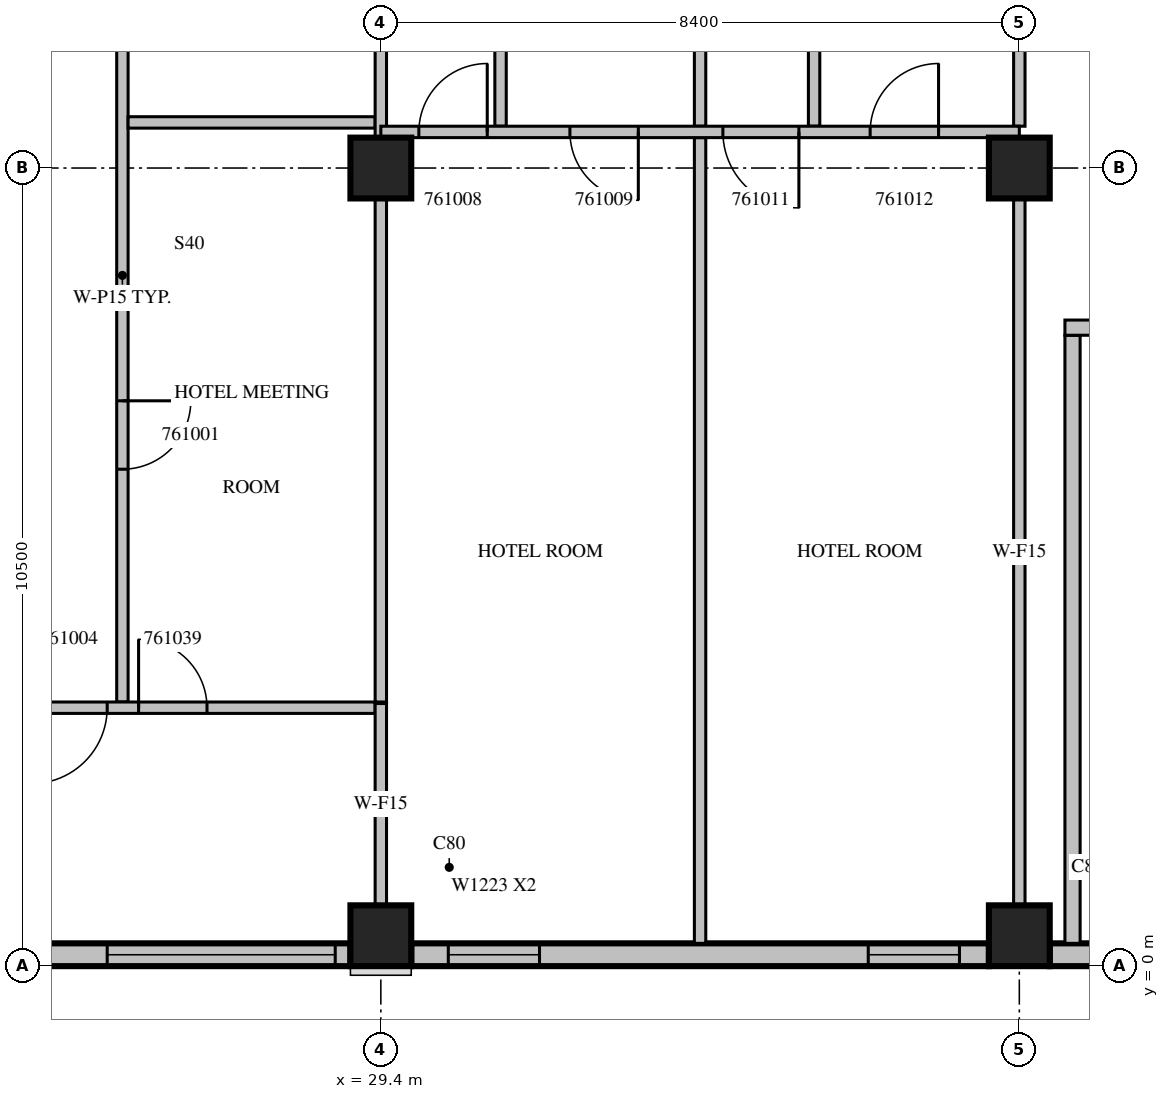
"""IFC4 building model, lengths in metres.
Left out: names, types, materials, properties, quantities, classifications, styles, units other than length and angle.
Written with IfcOpenShell. Run it as: python <this file> out.ifc"""

import sys

from ifc_helpers import new_model, si_unit, direction, frame, frame_2d, origin, origin_2d, place, context, subcontext, project, spatial, rectangle, extrude, source, transform, mapped, element, fill, save


model = new_model("IFC4")
c1 = context("Model", 3, precision=1e-05, world=origin(), true_north=direction((0.0, 1.0)))
c2 = subcontext(c1, "Body", "Model", "MODEL_VIEW")
j1 = project(units=[si_unit("LENGTHUNIT", "METRE"), si_unit("PLANEANGLEUNIT", "RADIAN")], contexts=[c1])
p1 = place(None, origin())
s1 = spatial("IfcSite", under=j1, at=p1, CompositionType="ELEMENT")
p2 = place(p1, origin())
s2 = spatial("IfcBuilding", under=s1, at=p2, CompositionType="ELEMENT")
p3 = place(p2, frame((0.0, 0.0, 265.2)))
s3 = spatial("IfcBuildingStorey", under=s2, at=p3, CompositionType="ELEMENT", Elevation=265.2)
m1 = source(origin(), c2, "Body", "SweptSolid", [
    extrude(rectangle(XDim=0.8, YDim=0.8, at=origin_2d()), origin(), (0.0, 0.0, 1.0), 3.8),
])
for number, where, z_axis, x_axis in (
    (1, (29.4, 0.4, 0.0), (0.0, 0.0, 1.0), (1.0, 0.0, 0.0)),
    (2, (37.8, 0.4, 0.0), (0.0, 0.0, 1.0), (1.0, 0.0, 0.0)),
    (3, (29.4, 10.5, 0.0), (0.0, 0.0, 1.0), (1.0, 0.0, 0.0)),
    (4, (37.8, 10.5, 0.0), (0.0, 0.0, 1.0), (1.0, 0.0, 0.0)),
):
    element("IfcColumn", number, at=place(p3, frame(where, z_axis=z_axis, x_axis=x_axis)), inside=s3, PredefinedType="COLUMN", context=c2, shape_type="MappedRepresentation", body=[
        mapped(m1, transform((0.0, 0.0, 0.0), scale=1.0)),
    ])
m2 = source(origin(), c2, "Body", "SweptSolid", [
    extrude(rectangle(XDim=7.6, YDim=0.3, at=frame_2d((3.8, 0.0))), origin(), (0.0, 0.0, 1.0), 3.4),
])
p4 = place(p3, frame((21.4, 0.15, 0.0), z_axis=(0.0, 0.0, 1.0), x_axis=(1.0, 0.0, 0.0)))
e5 = element("IfcWall", 5, at=p4, inside=s3, PredefinedType="STANDARD", context=c2, shape_type="MappedRepresentation", body=[
    mapped(m2, transform((0.0, 0.0, 0.0), scale=1.0)),
])
m3 = source(origin(), c2, "Body", "SweptSolid", [
    extrude(rectangle(XDim=3.0, YDim=2.3, at=frame_2d((1.5, 1.15))), frame((0.0, 0.16, 0.0), z_axis=(0.0, -1.0, 0.0), x_axis=(1.0, 0.0, 0.0)), (0.0, 0.0, 1.0), 0.32),
])
p5 = place(p4, frame((0.2, 0.0, 0.6)))
e6 = element("IfcOpeningElement", 6, at=p5, cuts=e5, PredefinedType="OPENING", context=c2, shape_type="MappedRepresentation", body=[
    mapped(m3, transform((0.0, 0.0, 0.0), scale=1.0)),
])
p6 = place(p4, frame((4.4, 0.0, 0.6)))
e7 = element("IfcOpeningElement", 7, at=p6, cuts=e5, PredefinedType="OPENING", context=c2, shape_type="MappedRepresentation", body=[
    mapped(m3, transform((0.0, 0.0, 0.0), scale=1.0)),
])
p7 = place(p3, frame((29.8, 0.15, 0.0), z_axis=(0.0, 0.0, 1.0), x_axis=(1.0, 0.0, 0.0)))
e8 = element("IfcWall", 8, at=p7, inside=s3, PredefinedType="STANDARD", context=c2, shape_type="MappedRepresentation", body=[
    mapped(m2, transform((0.0, 0.0, 0.0), scale=1.0)),
])
m4 = source(origin(), c2, "Body", "SweptSolid", [
    extrude(rectangle(XDim=1.2, YDim=2.3, at=frame_2d((0.6, 1.15))), frame((0.0, 0.16, 0.0), z_axis=(0.0, -1.0, 0.0), x_axis=(1.0, 0.0, 0.0)), (0.0, 0.0, 1.0), 0.32),
])
p8 = place(p7, frame((0.487, 0.0, 0.6)))
e9 = element("IfcOpeningElement", 9, at=p8, cuts=e8, PredefinedType="OPENING", context=c2, shape_type="MappedRepresentation", body=[
    mapped(m4, transform((0.0, 0.0, 0.0), scale=1.0)),
])
p9 = place(p7, frame((6.013, 0.0, 0.6)))
e10 = element("IfcOpeningElement", 10, at=p9, cuts=e8, PredefinedType="OPENING", context=c2, shape_type="MappedRepresentation", body=[
    mapped(m4, transform((0.0, 0.0, 0.0), scale=1.0)),
])
m5 = source(origin(), c2, "Body", "SweptSolid", [
    extrude(rectangle(XDim=2.0, YDim=0.3, at=frame_2d((1.0, 0.0))), origin(), (0.0, 0.0, 1.0), 3.4),
])
p10 = place(p3, frame((38.2, 0.15, 0.0), z_axis=(0.0, 0.0, 1.0), x_axis=(1.0, 0.0, 0.0)))
e11 = element("IfcWall", 11, at=p10, inside=s3, PredefinedType="STANDARD", context=c2, shape_type="MappedRepresentation", body=[
    mapped(m5, transform((0.0, 0.0, 0.0), scale=1.0)),
])
m6 = source(origin(), c2, "Body", "SweptSolid", [
    extrude(rectangle(XDim=8.0, YDim=0.2, at=frame_2d((4.0, 0.0))), origin(), (0.0, 0.0, 1.0), 3.4),
])
p11 = place(p3, frame((38.5, 0.3, 0.0), z_axis=(0.0, 0.0, 1.0), x_axis=(0.0, 1.0, 0.0)))
e12 = element("IfcWall", 12, at=p11, inside=s3, PredefinedType="PARTITIONING", context=c2, shape_type="MappedRepresentation", body=[
    mapped(m6, transform((0.0, 0.0, 0.0), scale=1.0)),
])
m7 = source(origin(), c2, "Body", "SweptSolid", [
    extrude(rectangle(XDim=5.45, YDim=0.2, at=frame_2d((2.725, 0.0))), origin(), (0.0, 0.0, 1.0), 3.4),
])
p12 = place(p3, frame((38.4, 8.4, 0.0), z_axis=(0.0, 0.0, 1.0), x_axis=(1.0, 0.0, 0.0)))
e13 = element("IfcWall", 13, at=p12, inside=s3, PredefinedType="PARTITIONING", context=c2, shape_type="MappedRepresentation", body=[
    mapped(m7, transform((0.0, 0.0, 0.0), scale=1.0)),
])
m8 = source(origin(), c2, "Body", "SweptSolid", [
    extrude(rectangle(XDim=1.2, YDim=2.1, at=frame_2d((0.6, 1.05))), frame((0.0, 0.11, 0.0), z_axis=(0.0, -1.0, 0.0), x_axis=(1.0, 0.0, 0.0)), (0.0, 0.0, 1.0), 0.22),
])
p13 = place(p12, frame((0.4, 0.0, 0.0)))
e14 = element("IfcOpeningElement", 14, at=p13, cuts=e13, PredefinedType="OPENING", context=c2, shape_type="MappedRepresentation", body=[
    mapped(m8, transform((0.0, 0.0, 0.0), scale=1.0)),
])
m9 = source(origin(), c2, "Body", "SweptSolid", [
    extrude(rectangle(XDim=0.9, YDim=2.1, at=frame_2d((0.45, 1.05))), frame((0.0, 0.11, 0.0), z_axis=(0.0, -1.0, 0.0), x_axis=(1.0, 0.0, 0.0)), (0.0, 0.0, 1.0), 0.22),
])
p14 = place(p12, frame((3.25, 0.0, 0.0)))
e15 = element("IfcOpeningElement", 15, at=p14, cuts=e13, PredefinedType="OPENING", context=c2, shape_type="MappedRepresentation", body=[
    mapped(m9, transform((0.0, 0.0, 0.0), scale=1.0)),
])
m10 = source(origin(), c2, "Body", "SweptSolid", [
    extrude(rectangle(XDim=11.225, YDim=0.15, at=frame_2d((5.612, 0.0))), origin(), (0.0, 0.0, 1.0), 3.4),
])
p15 = place(p3, frame((26.0, 14.7, 0.0), z_axis=(0.0, 0.0, 1.0), x_axis=(0.0, -1.0, 0.0)))
e16 = element("IfcWall", 16, at=p15, inside=s3, PredefinedType="PARTITIONING", context=c2, shape_type="MappedRepresentation", body=[
    mapped(m10, transform((0.0, 0.0, 0.0), scale=1.0)),
])
m11 = source(origin(), c2, "Body", "SweptSolid", [
    extrude(rectangle(XDim=0.9, YDim=2.1, at=frame_2d((0.45, 1.05))), frame((0.0, 0.085, 0.0), z_axis=(0.0, -1.0, 0.0), x_axis=(1.0, 0.0, 0.0)), (0.0, 0.0, 1.0), 0.17),
])
p16 = place(p15, frame((7.263, 0.0, 0.0)))
e17 = element("IfcOpeningElement", 17, at=p16, cuts=e16, PredefinedType="OPENING", context=c2, shape_type="MappedRepresentation", body=[
    mapped(m11, transform((0.0, 0.0, 0.0), scale=1.0)),
])
p17 = place(p15, frame((0.775, 0.0, 0.0)))
e18 = element("IfcOpeningElement", 18, at=p17, cuts=e16, PredefinedType="OPENING", context=c2, shape_type="MappedRepresentation", body=[
    mapped(m11, transform((0.0, 0.0, 0.0), scale=1.0)),
])
m12 = source(origin(), c2, "Body", "SweptSolid", [
    extrude(rectangle(XDim=3.25, YDim=0.15, at=frame_2d((1.625, 0.0))), origin(), (0.0, 0.0, 1.0), 3.4),
])
p18 = place(p3, frame((29.325, 11.1, 0.0), z_axis=(0.0, 0.0, 1.0), x_axis=(-1.0, 0.0, 0.0)))
e19 = element("IfcWall", 19, at=p18, inside=s3, PredefinedType="PARTITIONING", context=c2, shape_type="MappedRepresentation", body=[
    mapped(m12, transform((0.0, 0.0, 0.0), scale=1.0)),
])
m13 = source(origin(), c2, "Body", "SweptSolid", [
    extrude(rectangle(XDim=6.626, YDim=0.15, at=frame_2d((3.313, 0.0))), origin(), (0.0, 0.0, 1.0), 3.4),
])
p19 = place(p3, frame((29.4, 3.475, 0.0), z_axis=(0.0, 0.0, 1.0), x_axis=(0.0, 1.0, 0.0)))
e20 = element("IfcWall", 20, at=p19, inside=s3, PredefinedType="PARTITIONING", context=c2, shape_type="MappedRepresentation", body=[
    mapped(m13, transform((0.0, 0.0, 0.0), scale=1.0)),
])
m14 = source(origin(), c2, "Body", "SweptSolid", [
    extrude(rectangle(XDim=3.801, YDim=0.15, at=frame_2d((1.901, 0.0))), origin(), (0.0, 0.0, 1.0), 3.4),
])
p20 = place(p3, frame((29.4, 10.899, 0.0), z_axis=(0.0, 0.0, 1.0), x_axis=(0.0, 1.0, 0.0)))
e21 = element("IfcWall", 21, at=p20, inside=s3, PredefinedType="PARTITIONING", context=c2, shape_type="MappedRepresentation", body=[
    mapped(m14, transform((0.0, 0.0, 0.0), scale=1.0)),
])
m15 = source(origin(), c2, "Body", "SweptSolid", [
    extrude(rectangle(XDim=7.525, YDim=0.15, at=frame_2d((3.763, 0.0))), origin(), (0.0, 0.0, 1.0), 3.4),
])
p21 = place(p3, frame((21.8, 3.4, 0.0), z_axis=(0.0, 0.0, 1.0), x_axis=(1.0, 0.0, 0.0)))
e22 = element("IfcWall", 22, at=p21, inside=s3, PredefinedType="PARTITIONING", context=c2, shape_type="MappedRepresentation", body=[
    mapped(m15, transform((0.0, 0.0, 0.0), scale=1.0)),
])
m16 = source(origin(), c2, "Body", "SweptSolid", [
    extrude(rectangle(XDim=1.0, YDim=2.1, at=frame_2d((0.5, 1.05))), frame((0.0, 0.085, 0.0), z_axis=(0.0, -1.0, 0.0), x_axis=(1.0, 0.0, 0.0)), (0.0, 0.0, 1.0), 0.17),
])
p22 = place(p21, frame((3.0, 0.0, 0.0)))
e23 = element("IfcOpeningElement", 23, at=p22, cuts=e22, PredefinedType="OPENING", context=c2, shape_type="MappedRepresentation", body=[
    mapped(m16, transform((0.0, 0.0, 0.0), scale=1.0)),
])
p23 = place(p21, frame((4.413, 0.0, 0.0)))
e24 = element("IfcOpeningElement", 24, at=p23, cuts=e22, PredefinedType="OPENING", context=c2, shape_type="MappedRepresentation", body=[
    mapped(m11, transform((0.0, 0.0, 0.0), scale=1.0)),
])
m17 = source(origin(), c2, "Body", "SweptSolid", [
    extrude(rectangle(XDim=10.6, YDim=0.15, at=frame_2d((5.3, 0.0))), origin(), (0.0, 0.0, 1.0), 3.4),
])
p24 = place(p3, frame((33.6, 0.3, 0.0), z_axis=(0.0, 0.0, 1.0), x_axis=(0.0, 1.0, 0.0)))
e25 = element("IfcWall", 25, at=p24, inside=s3, PredefinedType="PARTITIONING", context=c2, shape_type="MappedRepresentation", body=[
    mapped(m17, transform((0.0, 0.0, 0.0), scale=1.0)),
])
m18 = source(origin(), c2, "Body", "SweptSolid", [
    extrude(rectangle(XDim=3.65, YDim=0.15, at=frame_2d((1.825, 0.0))), origin(), (0.0, 0.0, 1.0), 3.4),
])
for number, where, z_axis, x_axis in (
    (26, (30.975, 11.05, 0.0), (0.0, 0.0, 1.0), (0.0, 1.0, 0.0)),
    (27, (33.6, 11.05, 0.0), (0.0, 0.0, 1.0), (0.0, 1.0, 0.0)),
    (28, (35.1, 11.05, 0.0), (0.0, 0.0, 1.0), (0.0, 1.0, 0.0)),
):
    element("IfcWall", number, at=place(p3, frame(where, z_axis=z_axis, x_axis=x_axis)), inside=s3, PredefinedType="PARTITIONING", context=c2, shape_type="MappedRepresentation", body=[
        mapped(m18, transform((0.0, 0.0, 0.0), scale=1.0)),
    ])
m19 = source(origin(), c2, "Body", "SweptSolid", [
    extrude(rectangle(XDim=2.656, YDim=0.15, at=frame_2d((1.328, 0.0))), origin(), (0.0, 0.0, 1.0), 3.4),
])
p25 = place(p3, frame((29.4, 0.799, 0.0), z_axis=(0.0, 0.0, 1.0), x_axis=(0.0, 1.0, 0.0)))
e29 = element("IfcWall", 29, at=p25, inside=s3, PredefinedType="PARTITIONING", context=c2, shape_type="MappedRepresentation", body=[
    mapped(m19, transform((0.0, 0.0, 0.0), scale=1.0)),
])
m20 = source(origin(), c2, "Body", "SweptSolid", [
    extrude(rectangle(XDim=9.302, YDim=0.15, at=frame_2d((4.651, 0.0))), origin(), (0.0, 0.0, 1.0), 3.4),
])
p26 = place(p3, frame((37.8, 0.799, 0.0), z_axis=(0.0, 0.0, 1.0), x_axis=(0.0, 1.0, 0.0)))
e30 = element("IfcWall", 30, at=p26, inside=s3, PredefinedType="PARTITIONING", context=c2, shape_type="MappedRepresentation", body=[
    mapped(m20, transform((0.0, 0.0, 0.0), scale=1.0)),
])
p27 = place(p3, frame((37.8, 11.05, 0.0), z_axis=(0.0, 0.0, 1.0), x_axis=(0.0, 1.0, 0.0)))
e31 = element("IfcWall", 31, at=p27, inside=s3, PredefinedType="PARTITIONING", context=c2, shape_type="MappedRepresentation", body=[
    mapped(m18, transform((0.0, 0.0, 0.0), scale=1.0)),
])
m21 = source(origin(), c2, "Body", "SweptSolid", [
    extrude(rectangle(XDim=8.4, YDim=0.15, at=frame_2d((4.2, 0.0))), origin(), (0.0, 0.0, 1.0), 3.4),
])
p28 = place(p3, frame((37.8, 10.975, 0.0), z_axis=(0.0, 0.0, 1.0), x_axis=(-1.0, 0.0, 0.0)))
e32 = element("IfcWall", 32, at=p28, inside=s3, PredefinedType="PARTITIONING", context=c2, shape_type="MappedRepresentation", body=[
    mapped(m21, transform((0.0, 0.0, 0.0), scale=1.0)),
])
p29 = place(p28, frame((7.0, 0.0, 0.0)))
e33 = element("IfcOpeningElement", 33, at=p29, cuts=e32, PredefinedType="OPENING", context=c2, shape_type="MappedRepresentation", body=[
    mapped(m11, transform((0.0, 0.0, 0.0), scale=1.0)),
])
p30 = place(p28, frame((5.013, 0.0, 0.0)))
e34 = element("IfcOpeningElement", 34, at=p30, cuts=e32, PredefinedType="OPENING", context=c2, shape_type="MappedRepresentation", body=[
    mapped(m11, transform((0.0, 0.0, 0.0), scale=1.0)),
])
p31 = place(p28, frame((2.9, 0.0, 0.0)))
e35 = element("IfcOpeningElement", 35, at=p31, cuts=e32, PredefinedType="OPENING", context=c2, shape_type="MappedRepresentation", body=[
    mapped(m16, transform((0.0, 0.0, 0.0), scale=1.0)),
])
p32 = place(p28, frame((1.062, 0.0, 0.0)))
e36 = element("IfcOpeningElement", 36, at=p32, cuts=e32, PredefinedType="OPENING", context=c2, shape_type="MappedRepresentation", body=[
    mapped(m11, transform((0.0, 0.0, 0.0), scale=1.0)),
])
m22 = source(origin(), c2, "Body", "SweptSolid", [
    extrude(rectangle(XDim=3.0, YDim=2.3, at=frame_2d((1.5, 1.15))), frame((0.0, 0.03, 0.0), z_axis=(0.0, -1.0, 0.0), x_axis=(1.0, 0.0, 0.0)), (0.0, 0.0, 1.0), 0.06),
])
p33 = place(p6, origin())
e37 = element("IfcWindow", 37, at=p33, inside=s3, PartitioningType="SINGLE_PANEL", PredefinedType="WINDOW", context=c2, shape_type="MappedRepresentation", body=[
    mapped(m22, transform((0.0, 0.0, 0.0), scale=1.0)),
])
fill(e7, e37)
m23 = source(origin(), c2, "Body", "SweptSolid", [
    extrude(rectangle(XDim=1.2, YDim=2.3, at=frame_2d((0.6, 1.15))), frame((0.0, 0.03, 0.0), z_axis=(0.0, -1.0, 0.0), x_axis=(1.0, 0.0, 0.0)), (0.0, 0.0, 1.0), 0.06),
])
p34 = place(p8, origin())
e38 = element("IfcWindow", 38, at=p34, inside=s3, PartitioningType="SINGLE_PANEL", PredefinedType="WINDOW", context=c2, shape_type="MappedRepresentation", body=[
    mapped(m23, transform((0.0, 0.0, 0.0), scale=1.0)),
])
fill(e9, e38)
p35 = place(p9, origin())
e39 = element("IfcWindow", 39, at=p35, inside=s3, PartitioningType="SINGLE_PANEL", PredefinedType="WINDOW", context=c2, shape_type="MappedRepresentation", body=[
    mapped(m23, transform((0.0, 0.0, 0.0), scale=1.0)),
])
fill(e10, e39)
m24 = source(origin(), c2, "Body", "SweptSolid", [
    extrude(rectangle(XDim=0.9, YDim=2.1, at=frame_2d((0.45, 1.05))), frame((0.0, 0.025, 0.0), z_axis=(0.0, -1.0, 0.0), x_axis=(1.0, 0.0, 0.0)), (0.0, 0.0, 1.0), 0.05),
])
p36 = place(p16, origin())
e40 = element("IfcDoor", 40, at=p36, inside=s3, OperationType="SINGLE_SWING_LEFT", PredefinedType="DOOR", context=c2, shape_type="MappedRepresentation", body=[
    mapped(m24, transform((0.0, 0.0, 0.0), scale=1.0)),
])
fill(e17, e40)
m25 = source(origin(), c2, "Body", "SweptSolid", [
    extrude(rectangle(XDim=1.0, YDim=2.1, at=frame_2d((0.5, 1.05))), frame((0.0, 0.025, 0.0), z_axis=(0.0, -1.0, 0.0), x_axis=(1.0, 0.0, 0.0)), (0.0, 0.0, 1.0), 0.05),
])
p37 = place(p22, origin())
e41 = element("IfcDoor", 41, at=p37, inside=s3, OperationType="SINGLE_SWING_RIGHT", PredefinedType="DOOR", context=c2, shape_type="MappedRepresentation", body=[
    mapped(m25, transform((0.0, 0.0, 0.0), scale=1.0)),
])
fill(e23, e41)
p38 = place(p29, origin())
e42 = element("IfcDoor", 42, at=p38, inside=s3, OperationType="SINGLE_SWING_RIGHT", PredefinedType="DOOR", context=c2, shape_type="MappedRepresentation", body=[
    mapped(m24, transform((0.0, 0.0, 0.0), scale=1.0)),
])
fill(e33, e42)
p39 = place(p30, origin())
e43 = element("IfcDoor", 43, at=p39, inside=s3, OperationType="SINGLE_SWING_LEFT", PredefinedType="DOOR", context=c2, shape_type="MappedRepresentation", body=[
    mapped(m24, transform((0.0, 0.0, 0.0), scale=1.0)),
])
fill(e34, e43)
p40 = place(p31, origin())
e44 = element("IfcDoor", 44, at=p40, inside=s3, OperationType="SINGLE_SWING_LEFT", PredefinedType="DOOR", context=c2, shape_type="MappedRepresentation", body=[
    mapped(m25, transform((0.0, 0.0, 0.0), scale=1.0)),
])
fill(e35, e44)
p41 = place(p32, origin())
e45 = element("IfcDoor", 45, at=p41, inside=s3, OperationType="SINGLE_SWING_RIGHT", PredefinedType="DOOR", context=c2, shape_type="MappedRepresentation", body=[
    mapped(m24, transform((0.0, 0.0, 0.0), scale=1.0)),
])
fill(e36, e45)
p42 = place(p23, origin())
e46 = element("IfcDoor", 46, at=p42, inside=s3, OperationType="SINGLE_SWING_LEFT", PredefinedType="DOOR", context=c2, shape_type="MappedRepresentation", body=[
    mapped(m24, transform((0.0, 0.0, 0.0), scale=1.0)),
])
fill(e24, e46)
save(model, sys.argv[1])
